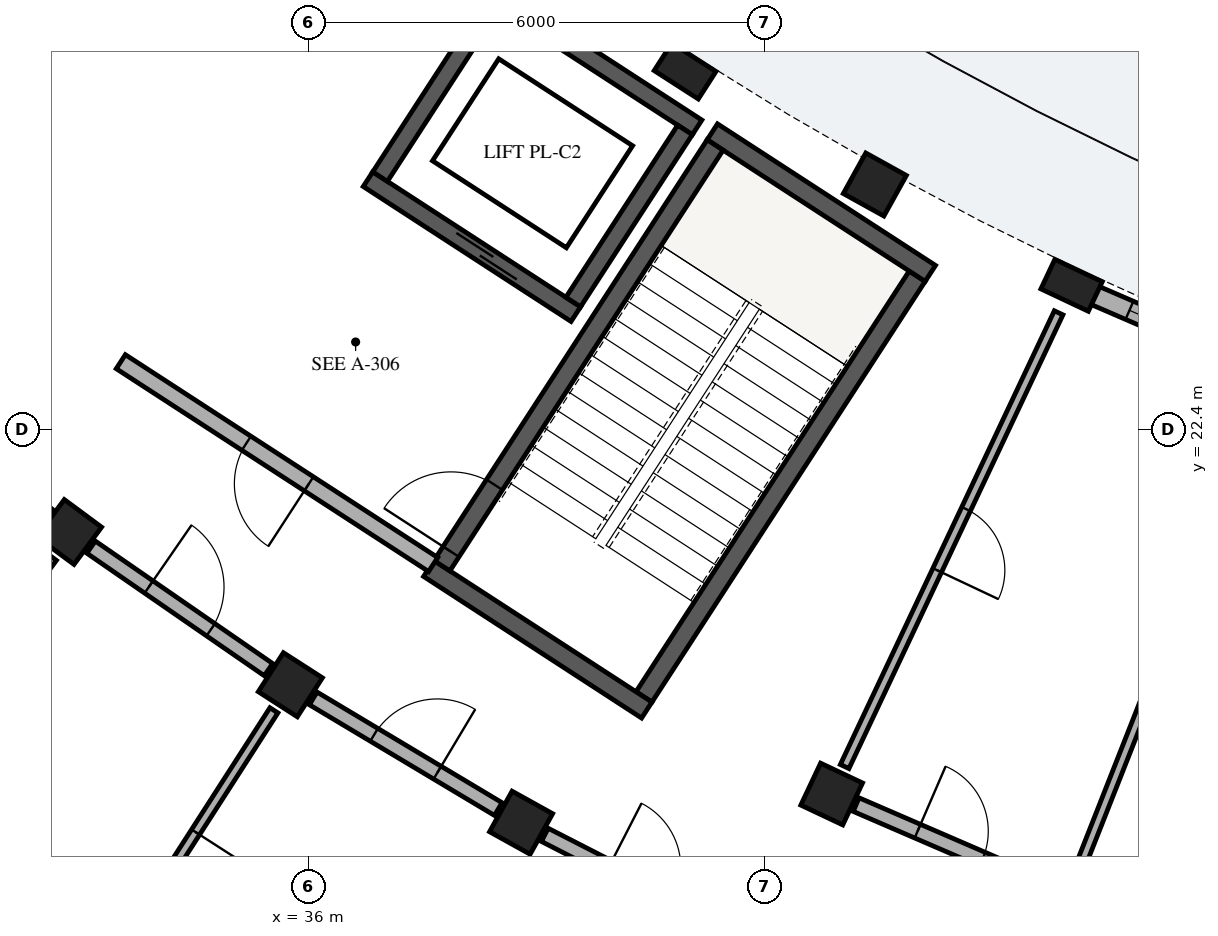
"""IFC4 building model, lengths in metres.
Left out: names, types, materials, properties, quantities, classifications, styles, units other than length and angle.
Written with IfcOpenShell. Run it as: python <this file> out.ifc"""

import sys

from ifc_helpers import new_model, si_unit, direction, frame, frame_2d, origin, origin_2d, place, context, subcontext, project, spatial, rectangle, extrude, element, fill, save


model = new_model("IFC4")
c1 = context("Model", 3, precision=1e-05, world=origin(), true_north=direction((0.0, 1.0)))
c2 = subcontext(c1, "Body", "Model", "MODEL_VIEW")
j1 = project(units=[si_unit("LENGTHUNIT", "METRE"), si_unit("PLANEANGLEUNIT", "RADIAN")], contexts=[c1])
p1 = place(None, origin())
s1 = spatial("IfcSite", under=j1, at=p1, CompositionType="ELEMENT")
p2 = place(p1, origin())
s2 = spatial("IfcBuilding", under=s1, at=p2, CompositionType="ELEMENT")
p3 = place(p2, origin())
s3 = spatial("IfcBuildingStorey", under=s2, at=p3, CompositionType="ELEMENT", Elevation=0.0)
p4 = place(p3, frame((40.413, 18.882, 0.0), z_axis=(0.0, 0.0, 1.0), x_axis=(0.544629435258, 0.838676802022, 0.0)))
e1 = element("IfcWall", 1, at=p4, inside=s3, PredefinedType="SHEAR", context=c2, shape_type="SweptSolid", body=[
    extrude(rectangle(XDim=6.6, YDim=0.25, at=frame_2d((3.3, 0.0))), origin(), (0.0, 0.0, 1.0), 4.48),
])
p5 = place(p3, frame((44.18, 24.454, 0.0), z_axis=(0.0, 0.0, 1.0), x_axis=(-0.838699580527, 0.544594356953, 0.0)))
e2 = element("IfcWall", 2, at=p5, inside=s3, PredefinedType="SHEAR", context=c2, shape_type="SweptSolid", body=[
    extrude(rectangle(XDim=3.42, YDim=0.25, at=frame_2d((1.71, 0.0))), origin(), (0.0, 0.0, 1.0), 4.48),
])
p6 = place(p3, frame((40.449, 18.709, 0.0), z_axis=(0.0, 0.0, 1.0), x_axis=(-0.838678407117, 0.544626963559, 0.0)))
e3 = element("IfcWall", 3, at=p6, inside=s3, PredefinedType="SHEAR", context=c2, shape_type="SweptSolid", body=[
    extrude(rectangle(XDim=3.42, YDim=0.25, at=frame_2d((1.71, 0.0))), origin(), (0.0, 0.0, 1.0), 4.48),
])
p7 = place(p3, frame((37.754, 20.608, 0.0), z_axis=(0.0, 0.0, 1.0), x_axis=(0.544655453679, 0.838659905312, 0.0)))
e4 = element("IfcWall", 4, at=p7, inside=s3, PredefinedType="SHEAR", context=c2, shape_type="SweptSolid", body=[
    extrude(rectangle(XDim=6.6, YDim=0.25, at=frame_2d((3.3, 0.0))), origin(), (0.0, 0.0, 1.0), 4.48),
])
p8 = place(p7, frame((0.22, 0.0, 0.0)))
e5 = element("IfcOpeningElement", 5, at=p8, cuts=e4, PredefinedType="OPENING", context=c2, shape_type="SweptSolid", body=[
    extrude(rectangle(XDim=1.05, YDim=2.15, at=frame_2d((0.525, 1.075))), frame((0.0, 0.135, 0.0), z_axis=(0.0, -1.0, 0.0), x_axis=(1.0, 0.0, 0.0)), (0.0, 0.0, 1.0), 0.27),
])
p9 = place(p3, frame((39.516, 23.917, 0.0), z_axis=(0.0, 0.0, 1.0), x_axis=(-0.838660840752, 0.544654013286, 0.0)))
e6 = element("IfcWall", 6, at=p9, inside=s3, PredefinedType="SHEAR", context=c2, shape_type="SweptSolid", body=[
    extrude(rectangle(XDim=3.26, YDim=0.23, at=frame_2d((1.63, 0.0))), origin(), (0.0, 0.0, 1.0), 4.48),
])
p10 = place(p9, frame((0.9, 0.0, 0.0)))
e7 = element("IfcOpeningElement", 7, at=p10, cuts=e6, PredefinedType="OPENING", context=c2, shape_type="SweptSolid", body=[
    extrude(rectangle(XDim=1.0, YDim=2.15, at=frame_2d((0.5, 1.075))), frame((0.0, 0.125, 0.0), z_axis=(0.0, -1.0, 0.0), x_axis=(1.0, 0.0, 0.0)), (0.0, 0.0, 1.0), 0.25),
])
p11 = place(p3, frame((41.112, 26.375, 0.0), z_axis=(0.0, 0.0, 1.0), x_axis=(-0.838638623546, 0.544688221919, 0.0)))
e8 = element("IfcWall", 8, at=p11, inside=s3, PredefinedType="SHEAR", context=c2, shape_type="SweptSolid", body=[
    extrude(rectangle(XDim=3.26, YDim=0.23, at=frame_2d((1.63, 0.0))), origin(), (0.0, 0.0, 1.0), 4.48),
])
p12 = place(p3, frame((39.482, 24.077, 0.0), z_axis=(0.0, 0.0, 1.0), x_axis=(0.544686387605, 0.838639814913, 0.0)))
e9 = element("IfcWall", 9, at=p12, inside=s3, PredefinedType="SHEAR", context=c2, shape_type="SweptSolid", body=[
    extrude(rectangle(XDim=2.7, YDim=0.23, at=frame_2d((1.35, 0.0))), origin(), (0.0, 0.0, 1.0), 4.48),
])
p13 = place(p3, frame((36.941, 25.727, 0.0), z_axis=(0.0, 0.0, 1.0), x_axis=(0.544622789439, 0.838681117722, 0.0)))
e10 = element("IfcWall", 10, at=p13, inside=s3, PredefinedType="SHEAR", context=c2, shape_type="SweptSolid", body=[
    extrude(rectangle(XDim=2.7, YDim=0.23, at=frame_2d((1.35, 0.0))), origin(), (0.0, 0.0, 1.0), 4.48),
])
p14 = place(p3, frame((32.85, 21.052, 0.0), z_axis=(0.0, 0.0, 1.0), x_axis=(-0.594822786751, -0.803856860617, 0.0)))
e11 = element("IfcColumn", 11, at=p14, inside=s3, PredefinedType="COLUMN", context=c2, shape_type="SweptSolid", body=[
    extrude(rectangle(XDim=0.61, YDim=0.61, at=origin_2d()), origin(), (0.0, 0.0, 1.0), 4.485),
])
p15 = place(p3, frame((40.954, 27.116, 0.0), z_axis=(0.0, 0.0, 1.0), x_axis=(-0.540974471368, -0.841039012964, 0.0)))
e12 = element("IfcColumn", 12, at=p15, inside=s3, PredefinedType="PILASTER", context=c2, shape_type="SweptSolid", body=[
    extrude(rectangle(XDim=0.43, YDim=0.69, at=origin_2d()), origin(), (0.0, 0.0, 1.0), 4.485),
])
for number, where, z_axis, x_axis in (
    (13, (35.76, 19.042, 0.0), (0.0, 0.0, 1.0), (-0.541, -0.841, 0.0)),
    (14, (43.45, 25.623, 0.0), (0.0, 0.0, 1.0), (-0.485, -0.875, 0.0)),
    (15, (38.796, 17.227, 0.0), (0.0, 0.0, 1.0), (-0.485, -0.875, 0.0)),
):
    element("IfcColumn", number, at=place(p3, frame(where, z_axis=z_axis, x_axis=x_axis)), inside=s3, PredefinedType="COLUMN", context=c2, shape_type="SweptSolid", body=[
        extrude(rectangle(XDim=0.61, YDim=0.61, at=origin_2d()), origin(), (0.0, 0.0, 1.0), 4.485),
    ])
p16 = place(p3, frame((46.039, 24.297, 0.0), z_axis=(0.0, 0.0, 1.0), x_axis=(-0.426568739901, -0.904455145454, 0.0)))
e16 = element("IfcColumn", 16, at=p16, inside=s3, PredefinedType="PILASTER", context=c2, shape_type="SweptSolid", body=[
    extrude(rectangle(XDim=0.43, YDim=0.69, at=origin_2d()), origin(), (0.0, 0.0, 1.0), 4.485),
])
p17 = place(p3, frame((42.882, 17.604, 0.0), z_axis=(0.0, 0.0, 1.0), x_axis=(-0.426568739901, -0.904455145454, 0.0)))
e17 = element("IfcColumn", 17, at=p17, inside=s3, PredefinedType="COLUMN", context=c2, shape_type="SweptSolid", body=[
    extrude(rectangle(XDim=0.61, YDim=0.61, at=origin_2d()), origin(), (0.0, 0.0, 1.0), 4.485),
])
p18 = place(p3, frame((46.209, 24.224, 0.0), z_axis=(0.0, 0.0, 1.0), x_axis=(0.917908073111, -0.396793106439, 0.0)))
e18 = element("IfcWall", 18, at=p18, inside=s3, PredefinedType="SOLIDWALL", context=c2, shape_type="SweptSolid", body=[
    extrude(rectangle(XDim=2.449, YDim=0.26, at=frame_2d((1.224, 0.0))), origin(), (0.0, 0.0, 1.0), 3.755),
])
p19 = place(p18, frame((0.644, 0.0, 0.55)))
e19 = element("IfcOpeningElement", 19, at=p19, cuts=e18, PredefinedType="OPENING", context=c2, shape_type="SweptSolid", body=[
    extrude(rectangle(XDim=1.16, YDim=1.485, at=frame_2d((0.58, 0.743))), frame((0.0, 0.14, 0.0), z_axis=(0.0, -1.0, 0.0), x_axis=(1.0, 0.0, 0.0)), (0.0, 0.0, 1.0), 0.28),
])
p20 = place(p3, frame((37.639, 20.623, 0.0), z_axis=(0.0, 0.0, 1.0), x_axis=(-0.838681446513, 0.544622283124, 0.0)))
e20 = element("IfcWall", 20, at=p20, inside=s3, PredefinedType="PARTITIONING", context=c2, shape_type="SweptSolid", body=[
    extrude(rectangle(XDim=4.9, YDim=0.22, at=frame_2d((2.45, 0.0))), origin(), (0.0, 0.0, 1.0), 3.74),
])
p21 = place(p20, frame((1.95, 0.0, 0.0)))
e21 = element("IfcOpeningElement", 21, at=p21, cuts=e20, PredefinedType="OPENING", context=c2, shape_type="SweptSolid", body=[
    extrude(rectangle(XDim=0.98, YDim=2.14, at=frame_2d((0.49, 1.07))), frame((0.0, 0.12, 0.0), z_axis=(0.0, -1.0, 0.0), x_axis=(1.0, 0.0, 0.0)), (0.0, 0.0, 1.0), 0.24),
])
p22 = place(p3, frame((30.351, 23.03, 0.0), z_axis=(0.0, 0.0, 1.0), x_axis=(0.783965548427, -0.620804332201, 0.0)))
e22 = element("IfcWall", 22, at=p22, inside=s3, PredefinedType="PARTITIONING", context=c2, shape_type="SweptSolid", body=[
    extrude(rectangle(XDim=2.837, YDim=0.195, at=frame_2d((1.418, 0.0))), origin(), (0.0, 0.0, 1.0), 3.1),
])
p23 = place(p22, frame((0.954, 0.0, 0.0)))
e23 = element("IfcOpeningElement", 23, at=p23, cuts=e22, PredefinedType="OPENING", context=c2, shape_type="SweptSolid", body=[
    extrude(rectangle(XDim=0.93, YDim=2.12, at=frame_2d((0.465, 1.06))), frame((0.0, 0.107, 0.0), z_axis=(0.0, -1.0, 0.0), x_axis=(1.0, 0.0, 0.0)), (0.0, 0.0, 1.0), 0.215),
])
p24 = place(p3, frame((32.612, 20.73, 0.0), z_axis=(0.0, 0.0, 1.0), x_axis=(-0.59482622273, -0.803854318116, 0.0)))
e24 = element("IfcWall", 24, at=p24, inside=s3, PredefinedType="PARTITIONING", context=c2, shape_type="SweptSolid", body=[
    extrude(rectangle(XDim=4.7, YDim=0.175, at=frame_2d((2.35, 0.0))), origin(), (0.0, 0.0, 1.0), 3.1),
])
p25 = place(p3, frame((33.138, 20.853, 0.0), z_axis=(0.0, 0.0, 1.0), x_axis=(0.822870075235, -0.568229565653, 0.0)))
e25 = element("IfcWall", 25, at=p25, inside=s3, PredefinedType="PARTITIONING", context=c2, shape_type="SweptSolid", body=[
    extrude(rectangle(XDim=2.837, YDim=0.195, at=frame_2d((1.418, 0.0))), origin(), (0.0, 0.0, 1.0), 3.1),
])
p26 = place(p25, frame((0.924, 0.0, 0.0)))
e26 = element("IfcOpeningElement", 26, at=p26, cuts=e25, PredefinedType="OPENING", context=c2, shape_type="SweptSolid", body=[
    extrude(rectangle(XDim=0.99, YDim=2.16, at=frame_2d((0.495, 1.08))), frame((0.0, 0.107, 0.0), z_axis=(0.0, -1.0, 0.0), x_axis=(1.0, 0.0, 0.0)), (0.0, 0.0, 1.0), 0.215),
])
p27 = place(p3, frame((35.544, 18.705, 0.0), z_axis=(0.0, 0.0, 1.0), x_axis=(-0.540959731567, -0.84104849374, 0.0)))
e27 = element("IfcWall", 27, at=p27, inside=s3, PredefinedType="PARTITIONING", context=c2, shape_type="SweptSolid", body=[
    extrude(rectangle(XDim=4.7, YDim=0.125, at=frame_2d((2.35, 0.0))), origin(), (0.0, 0.0, 1.0), 3.1),
])
p28 = place(p27, frame((1.905, 0.0, 0.0)))
e28 = element("IfcOpeningElement", 28, at=p28, cuts=e27, PredefinedType="OPENING", context=c2, shape_type="SweptSolid", body=[
    extrude(rectangle(XDim=0.89, YDim=2.1, at=frame_2d((0.445, 1.05))), frame((0.0, 0.073, 0.0), z_axis=(0.0, -1.0, 0.0), x_axis=(1.0, 0.0, 0.0)), (0.0, 0.0, 1.0), 0.145),
])
p29 = place(p3, frame((36.061, 18.862, 0.0), z_axis=(0.0, 0.0, 1.0), x_axis=(0.858281647443, -0.51317892948, 0.0)))
e29 = element("IfcWall", 29, at=p29, inside=s3, PredefinedType="PARTITIONING", context=c2, shape_type="SweptSolid", body=[
    extrude(rectangle(XDim=2.837, YDim=0.195, at=frame_2d((1.418, 0.0))), origin(), (0.0, 0.0, 1.0), 3.1),
])
p30 = place(p29, frame((0.934, 0.0, 0.0)))
e30 = element("IfcOpeningElement", 30, at=p30, cuts=e29, PredefinedType="OPENING", context=c2, shape_type="SweptSolid", body=[
    extrude(rectangle(XDim=0.97, YDim=2.15, at=frame_2d((0.485, 1.075))), frame((0.0, 0.107, 0.0), z_axis=(0.0, -1.0, 0.0), x_axis=(1.0, 0.0, 0.0)), (0.0, 0.0, 1.0), 0.215),
])
p31 = place(p3, frame((39.107, 17.067, 0.0), z_axis=(0.0, 0.0, 1.0), x_axis=(0.890030590607, -0.45590080915, 0.0)))
e31 = element("IfcWall", 31, at=p31, inside=s3, PredefinedType="PARTITIONING", context=c2, shape_type="SweptSolid", body=[
    extrude(rectangle(XDim=2.837, YDim=0.195, at=frame_2d((1.418, 0.0))), origin(), (0.0, 0.0, 1.0), 3.1),
])
p32 = place(p31, frame((0.944, 0.0, 0.0)))
e32 = element("IfcOpeningElement", 32, at=p32, cuts=e31, PredefinedType="OPENING", context=c2, shape_type="SweptSolid", body=[
    extrude(rectangle(XDim=0.95, YDim=2.13, at=frame_2d((0.475, 1.065))), frame((0.0, 0.107, 0.0), z_axis=(0.0, -1.0, 0.0), x_axis=(1.0, 0.0, 0.0)), (0.0, 0.0, 1.0), 0.215),
])
p33 = place(p3, frame((45.868, 23.935, 0.0), z_axis=(0.0, 0.0, 1.0), x_axis=(-0.426573573579, -0.904452865728, 0.0)))
e33 = element("IfcWall", 33, at=p33, inside=s3, PredefinedType="PARTITIONING", context=c2, shape_type="SweptSolid", body=[
    extrude(rectangle(XDim=6.6, YDim=0.125, at=frame_2d((3.3, 0.0))), origin(), (0.0, 0.0, 1.0), 3.1),
])
p34 = place(p33, frame((2.855, 0.0, 0.0)))
e34 = element("IfcOpeningElement", 34, at=p34, cuts=e33, PredefinedType="OPENING", context=c2, shape_type="SweptSolid", body=[
    extrude(rectangle(XDim=0.89, YDim=2.1, at=frame_2d((0.445, 1.05))), frame((0.0, 0.073, 0.0), z_axis=(0.0, -1.0, 0.0), x_axis=(1.0, 0.0, 0.0)), (0.0, 0.0, 1.0), 0.145),
])
p35 = place(p3, frame((43.204, 17.465, 0.0), z_axis=(0.0, 0.0, 1.0), x_axis=(0.91793557165, -0.39672948756, 0.0)))
e35 = element("IfcWall", 35, at=p35, inside=s3, PredefinedType="PARTITIONING", context=c2, shape_type="SweptSolid", body=[
    extrude(rectangle(XDim=2.693, YDim=0.195, at=frame_2d((1.346, 0.0))), origin(), (0.0, 0.0, 1.0), 3.1),
])
p36 = place(p35, frame((0.882, 0.0, 0.0)))
e36 = element("IfcOpeningElement", 36, at=p36, cuts=e35, PredefinedType="OPENING", context=c2, shape_type="SweptSolid", body=[
    extrude(rectangle(XDim=0.93, YDim=2.12, at=frame_2d((0.465, 1.06))), frame((0.0, 0.107, 0.0), z_axis=(0.0, -1.0, 0.0), x_axis=(1.0, 0.0, 0.0)), (0.0, 0.0, 1.0), 0.215),
])
p37 = place(p3, frame((48.562, 22.771, 0.0), z_axis=(0.0, 0.0, 1.0), x_axis=(-0.366512873936, -0.930412979939, 0.0)))
e37 = element("IfcWall", 37, at=p37, inside=s3, PredefinedType="PARTITIONING", context=c2, shape_type="SweptSolid", body=[
    extrude(rectangle(XDim=6.6, YDim=0.125, at=frame_2d((3.3, 0.0))), origin(), (0.0, 0.0, 1.0), 3.1),
])
p38 = place(p37, frame((2.865, 0.0, 0.0)))
e38 = element("IfcOpeningElement", 38, at=p38, cuts=e37, PredefinedType="OPENING", context=c2, shape_type="SweptSolid", body=[
    extrude(rectangle(XDim=0.87, YDim=2.08, at=frame_2d((0.435, 1.04))), frame((0.0, 0.073, 0.0), z_axis=(0.0, -1.0, 0.0), x_axis=(1.0, 0.0, 0.0)), (0.0, 0.0, 1.0), 0.145),
])
p39 = place(p19, origin())
e39 = element("IfcWindow", 39, at=p39, inside=s3, PartitioningType="SINGLE_PANEL", PredefinedType="WINDOW", context=c2, shape_type="SweptSolid", body=[
    extrude(rectangle(XDim=1.16, YDim=1.485, at=frame_2d((0.58, 0.743))), frame((0.0, 0.03, 0.0), z_axis=(0.0, -1.0, 0.0), x_axis=(1.0, 0.0, 0.0)), (0.0, 0.0, 1.0), 0.06),
])
fill(e19, e39)
p40 = place(p8, origin())
e40 = element("IfcDoor", 40, at=p40, inside=s3, OperationType="SINGLE_SWING_LEFT", PredefinedType="DOOR", context=c2, shape_type="SweptSolid", body=[
    extrude(rectangle(XDim=1.05, YDim=2.15, at=frame_2d((0.525, 1.075))), frame((0.0, 0.025, 0.0), z_axis=(0.0, -1.0, 0.0), x_axis=(1.0, 0.0, 0.0)), (0.0, 0.0, 1.0), 0.05),
])
fill(e5, e40)
p41 = place(p10, origin())
e41 = element("IfcDoor", 41, at=p41, inside=s3, OperationType="DOUBLE_DOOR_SLIDING", PredefinedType="DOOR", context=c2, shape_type="SweptSolid", body=[
    extrude(rectangle(XDim=1.0, YDim=2.15, at=frame_2d((0.5, 1.075))), frame((0.0, 0.025, 0.0), z_axis=(0.0, -1.0, 0.0), x_axis=(1.0, 0.0, 0.0)), (0.0, 0.0, 1.0), 0.05),
])
fill(e7, e41)
p42 = place(p21, origin())
e42 = element("IfcDoor", 42, at=p42, inside=s3, OperationType="SINGLE_SWING_LEFT", PredefinedType="DOOR", context=c2, shape_type="SweptSolid", body=[
    extrude(rectangle(XDim=0.98, YDim=2.14, at=frame_2d((0.49, 1.07))), frame((0.0, 0.025, 0.0), z_axis=(0.0, -1.0, 0.0), x_axis=(1.0, 0.0, 0.0)), (0.0, 0.0, 1.0), 0.05),
])
fill(e21, e42)
p43 = place(p26, origin())
e43 = element("IfcDoor", 43, at=p43, inside=s3, OperationType="SINGLE_SWING_LEFT", PredefinedType="DOOR", context=c2, shape_type="SweptSolid", body=[
    extrude(rectangle(XDim=0.99, YDim=2.16, at=frame_2d((0.495, 1.08))), frame((0.0, 0.025, 0.0), z_axis=(0.0, -1.0, 0.0), x_axis=(1.0, 0.0, 0.0)), (0.0, 0.0, 1.0), 0.05),
])
fill(e26, e43)
p44 = place(p28, origin())
e44 = element("IfcDoor", 44, at=p44, inside=s3, OperationType="SINGLE_SWING_LEFT", PredefinedType="DOOR", context=c2, shape_type="SweptSolid", body=[
    extrude(rectangle(XDim=0.89, YDim=2.1, at=frame_2d((0.445, 1.05))), frame((0.0, 0.025, 0.0), z_axis=(0.0, -1.0, 0.0), x_axis=(1.0, 0.0, 0.0)), (0.0, 0.0, 1.0), 0.05),
])
fill(e28, e44)
p45 = place(p30, origin())
e45 = element("IfcDoor", 45, at=p45, inside=s3, OperationType="SINGLE_SWING_RIGHT", PredefinedType="DOOR", context=c2, shape_type="SweptSolid", body=[
    extrude(rectangle(XDim=0.97, YDim=2.15, at=frame_2d((0.485, 1.075))), frame((0.0, 0.025, 0.0), z_axis=(0.0, -1.0, 0.0), x_axis=(1.0, 0.0, 0.0)), (0.0, 0.0, 1.0), 0.05),
])
fill(e30, e45)
p46 = place(p34, origin())
e46 = element("IfcDoor", 46, at=p46, inside=s3, OperationType="SINGLE_SWING_RIGHT", PredefinedType="DOOR", context=c2, shape_type="SweptSolid", body=[
    extrude(rectangle(XDim=0.89, YDim=2.1, at=frame_2d((0.445, 1.05))), frame((0.0, 0.025, 0.0), z_axis=(0.0, -1.0, 0.0), x_axis=(1.0, 0.0, 0.0)), (0.0, 0.0, 1.0), 0.05),
])
fill(e34, e46)
p47 = place(p36, origin())
e47 = element("IfcDoor", 47, at=p47, inside=s3, OperationType="SINGLE_SWING_LEFT", PredefinedType="DOOR", context=c2, shape_type="SweptSolid", body=[
    extrude(rectangle(XDim=0.93, YDim=2.12, at=frame_2d((0.465, 1.06))), frame((0.0, 0.025, 0.0), z_axis=(0.0, -1.0, 0.0), x_axis=(1.0, 0.0, 0.0)), (0.0, 0.0, 1.0), 0.05),
])
fill(e36, e47)
save(model, sys.argv[1])
